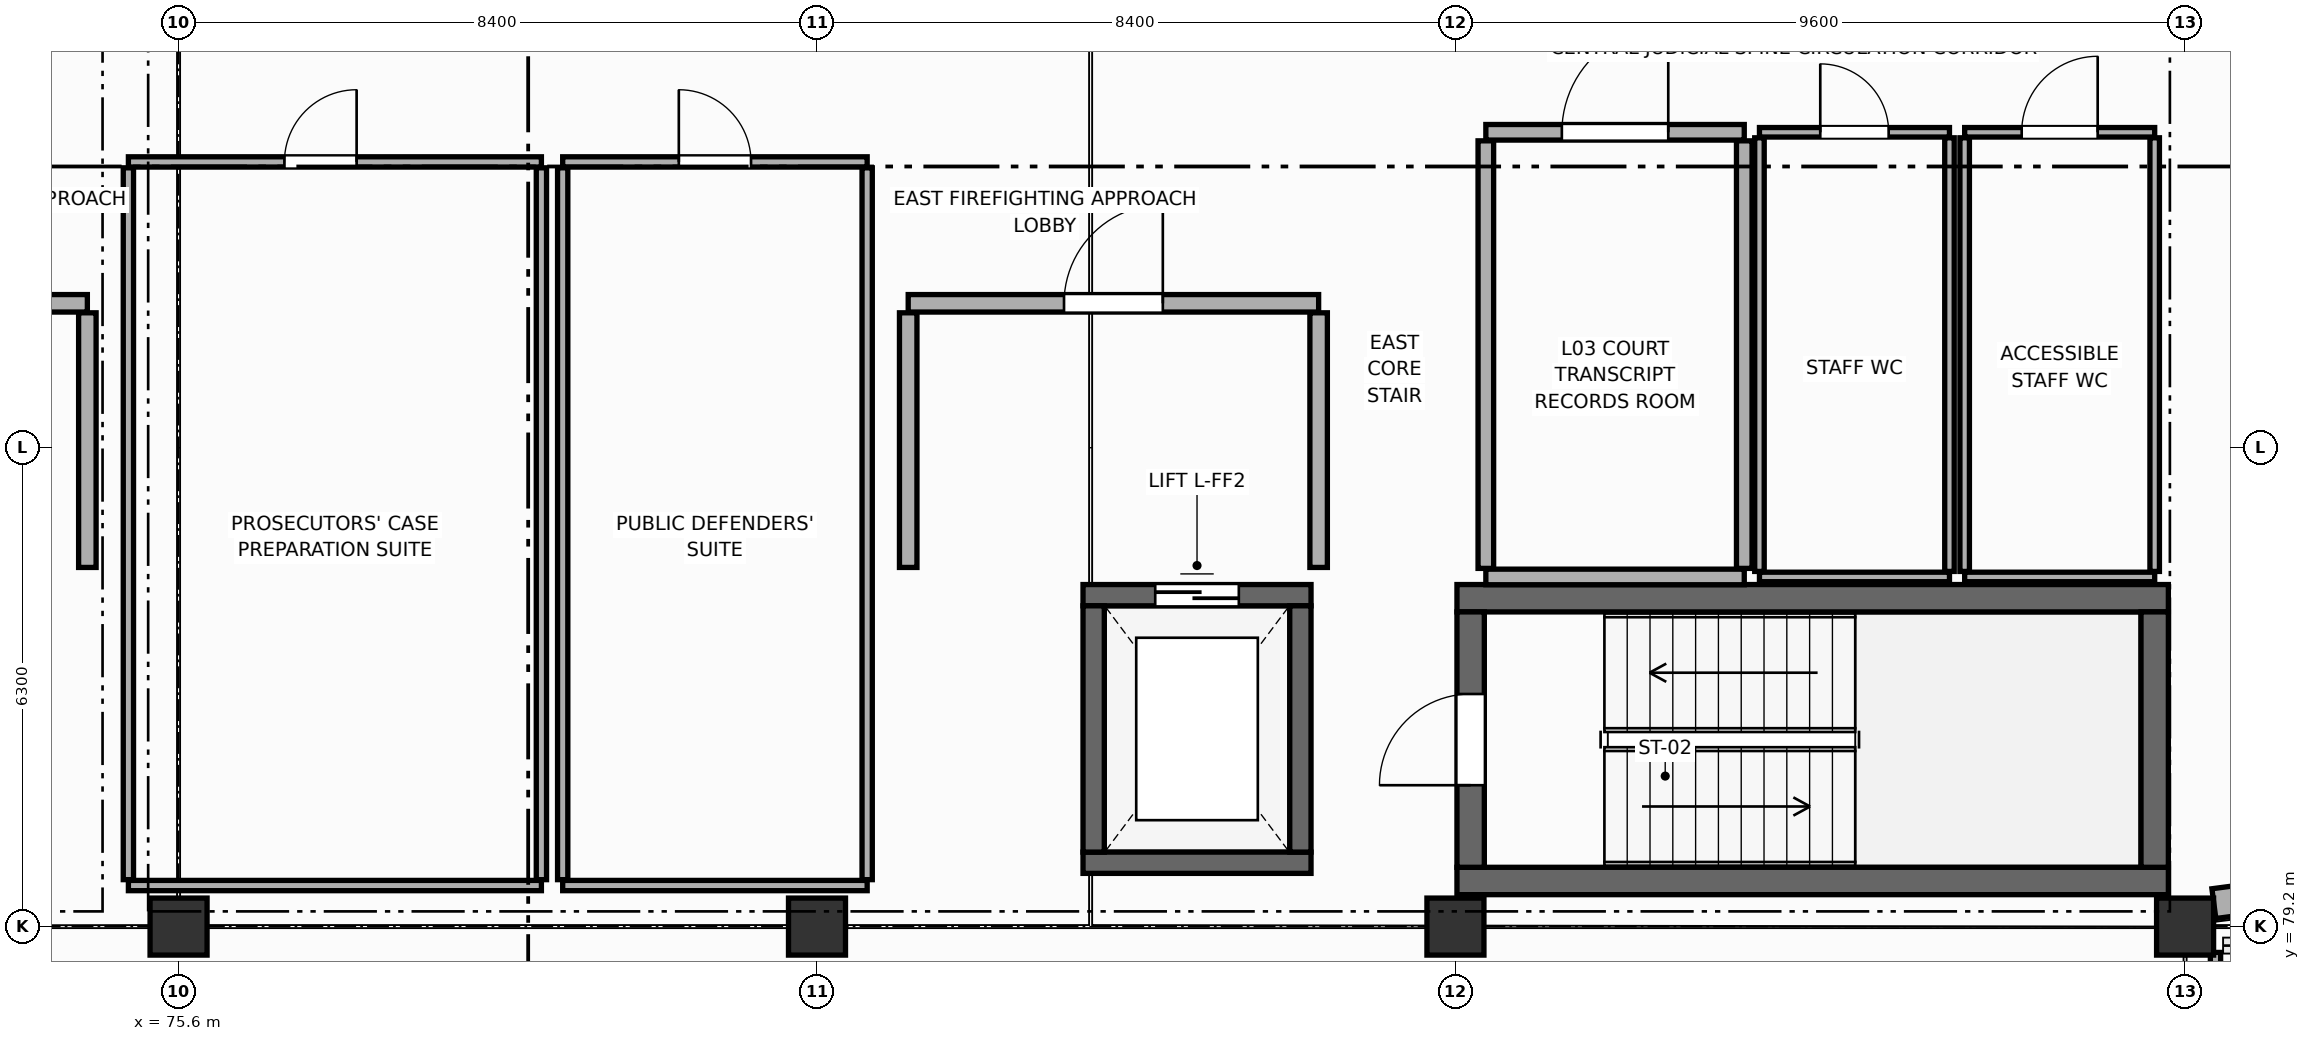
"""IFC4 building model, lengths in metres.
Left out: names, types, materials, properties, quantities, classifications, styles, units other than length and angle.
Written with IfcOpenShell. Run it as: python <this file> out.ifc"""

import sys

from ifc_helpers import new_model, si_unit, direction, frame, frame_2d, origin, origin_2d, place, context, subcontext, project, spatial, rectangle, extrude, element, fill, save


model = new_model("IFC4")
c1 = context("Model", 3, precision=1e-05, world=origin(), true_north=direction((0.0, 1.0)))
c2 = subcontext(c1, "Body", "Model", "MODEL_VIEW")
j1 = project(units=[si_unit("LENGTHUNIT", "METRE"), si_unit("PLANEANGLEUNIT", "RADIAN")], contexts=[c1])
p1 = place(None, origin())
s1 = spatial("IfcSite", under=j1, at=p1, CompositionType="ELEMENT")
p2 = place(p1, origin())
s2 = spatial("IfcBuilding", under=s1, at=p2, CompositionType="ELEMENT")
p3 = place(p2, frame((0.0, 0.0, 9.9)))
s3 = spatial("IfcBuildingStorey", under=s2, at=p3, CompositionType="ELEMENT", Elevation=9.9)
for number, where, z_axis, x_axis in (
    (1, (75.6, 79.2, 0.0), (0.0, 0.0, 1.0), (1.0, 0.0, 0.0)),
    (2, (84.0, 79.2, 0.0), (0.0, 0.0, 1.0), (1.0, 0.0, 0.0)),
    (3, (92.4, 79.2, 0.0), (0.0, 0.0, 1.0), (1.0, 0.0, 0.0)),
    (4, (102.0, 79.2, 0.0), (0.0, 0.0, 1.0), (1.0, 0.0, 0.0)),
):
    element("IfcColumn", number, at=place(p3, frame(where, z_axis=z_axis, x_axis=x_axis)), inside=s3, PredefinedType="COLUMN", context=c2, shape_type="SweptSolid", body=[
        extrude(rectangle(XDim=0.75, YDim=0.75, at=origin_2d()), origin(), (0.0, 0.0, 1.0), 4.5),
    ])
p4 = place(p3, frame((102.379, 79.502, 0.0), z_axis=(0.0, 0.0, 1.0), x_axis=(0.991440991126, 0.130555586306, 0.0)))
e5 = element("IfcWall", 5, at=p4, inside=s3, PredefinedType="ELEMENTEDWALL", context=c2, shape_type="SweptSolid", body=[
    extrude(rectangle(XDim=2.874, YDim=0.395, at=frame_2d((1.437, 0.0))), origin(), (0.0, 0.0, 1.0), 3.38),
])
p5 = place(p4, frame((0.987, 0.0, 0.85)))
e6 = element("IfcOpeningElement", 6, at=p5, cuts=e5, PredefinedType="OPENING", context=c2, shape_type="SweptSolid", body=[
    extrude(rectangle(XDim=0.9, YDim=1.85, at=frame_2d((0.45, 0.925))), frame((0.0, 0.208, 0.0), z_axis=(0.0, -1.0, 0.0), x_axis=(1.0, 0.0, 0.0)), (0.0, 0.0, 1.0), 0.415),
])
for number, where, z_axis, x_axis in (
    (7, (92.42, 83.52, 0.0), (0.0, 0.0, 1.0), (1.0, 0.0, 0.0)),
    (8, (101.78, 79.8, 0.0), (0.0, 0.0, 1.0), (-1.0, 0.0, 0.0)),
):
    element("IfcWall", number, at=place(p3, frame(where, z_axis=z_axis, x_axis=x_axis)), inside=s3, PredefinedType="SHEAR", context=c2, shape_type="SweptSolid", body=[
        extrude(rectangle(XDim=9.36, YDim=0.36, at=frame_2d((4.68, 0.0))), origin(), (0.0, 0.0, 1.0), 4.25),
    ])
p6 = place(p3, frame((92.6, 79.98, 0.0), z_axis=(0.0, 0.0, 1.0), x_axis=(0.0, 1.0, 0.0)))
e9 = element("IfcWall", 9, at=p6, inside=s3, PredefinedType="SHEAR", context=c2, shape_type="SweptSolid", body=[
    extrude(rectangle(XDim=3.36, YDim=0.36, at=frame_2d((1.68, 0.0))), origin(), (0.0, 0.0, 1.0), 4.25),
])
p7 = place(p6, frame((1.08, 0.0, 0.0)))
e10 = element("IfcOpeningElement", 10, at=p7, cuts=e9, PredefinedType="OPENING", context=c2, shape_type="SweptSolid", body=[
    extrude(rectangle(XDim=1.2, YDim=2.2, at=frame_2d((0.6, 1.1))), frame((0.0, 0.19, 0.0), z_axis=(0.0, -1.0, 0.0), x_axis=(1.0, 0.0, 0.0)), (0.0, 0.0, 1.0), 0.38),
])
p8 = place(p3, frame((101.6, 83.34, 0.0), z_axis=(0.0, 0.0, 1.0), x_axis=(0.0, -1.0, 0.0)))
e11 = element("IfcWall", 11, at=p8, inside=s3, PredefinedType="SHEAR", context=c2, shape_type="SweptSolid", body=[
    extrude(rectangle(XDim=3.36, YDim=0.36, at=frame_2d((1.68, 0.0))), origin(), (0.0, 0.0, 1.0), 4.25),
])
p9 = place(p3, frame((87.5, 83.56, 0.0), z_axis=(0.0, 0.0, 1.0), x_axis=(1.0, 0.0, 0.0)))
e12 = element("IfcWall", 12, at=p9, inside=s3, PredefinedType="SHEAR", context=c2, shape_type="SweptSolid", body=[
    extrude(rectangle(XDim=3.0, YDim=0.28, at=frame_2d((1.5, 0.0))), origin(), (0.0, 0.0, 1.0), 4.25),
])
p10 = place(p9, frame((0.95, 0.0, 0.0)))
e13 = element("IfcOpeningElement", 13, at=p10, cuts=e12, PredefinedType="OPENING", context=c2, shape_type="SweptSolid", body=[
    extrude(rectangle(XDim=1.1, YDim=2.2, at=frame_2d((0.55, 1.1))), frame((0.0, 0.15, 0.0), z_axis=(0.0, -1.0, 0.0), x_axis=(1.0, 0.0, 0.0)), (0.0, 0.0, 1.0), 0.3),
])
p11 = place(p3, frame((90.5, 80.04, 0.0), z_axis=(0.0, 0.0, 1.0), x_axis=(-1.0, 0.0, 0.0)))
e14 = element("IfcWall", 14, at=p11, inside=s3, PredefinedType="SHEAR", context=c2, shape_type="SweptSolid", body=[
    extrude(rectangle(XDim=3.0, YDim=0.28, at=frame_2d((1.5, 0.0))), origin(), (0.0, 0.0, 1.0), 4.25),
])
for number, where, z_axis, x_axis in (
    (15, (87.64, 80.18, 0.0), (0.0, 0.0, 1.0), (0.0, 1.0, 0.0)),
    (16, (90.36, 83.42, 0.0), (0.0, 0.0, 1.0), (0.0, -1.0, 0.0)),
):
    element("IfcWall", number, at=place(p3, frame(where, z_axis=z_axis, x_axis=x_axis)), inside=s3, PredefinedType="SHEAR", context=c2, shape_type="SweptSolid", body=[
        extrude(rectangle(XDim=3.24, YDim=0.28, at=frame_2d((1.62, 0.0))), origin(), (0.0, 0.0, 1.0), 4.25),
    ])
p12 = place(p3, frame((69.0, 87.4, 0.0), z_axis=(0.0, 0.0, 1.0), x_axis=(1.0, 0.0, 0.0)))
e17 = element("IfcWall", 17, at=p12, inside=s3, PredefinedType="STANDARD", context=c2, shape_type="SweptSolid", body=[
    extrude(rectangle(XDim=5.4, YDim=0.23, at=frame_2d((2.7, 0.0))), origin(), (0.0, 0.0, 1.0), 4.235),
])
p13 = place(p12, frame((2.05, 0.0, 0.0)))
e18 = element("IfcOpeningElement", 18, at=p13, cuts=e17, PredefinedType="OPENING", context=c2, shape_type="SweptSolid", body=[
    extrude(rectangle(XDim=1.3, YDim=2.2, at=frame_2d((0.65, 1.1))), frame((0.0, 0.125, 0.0), z_axis=(0.0, -1.0, 0.0), x_axis=(1.0, 0.0, 0.0)), (0.0, 0.0, 1.0), 0.25),
])
p14 = place(p3, frame((74.4, 87.275, 0.0), z_axis=(0.0, 0.0, 1.0), x_axis=(0.0, -1.0, 0.0)))
e19 = element("IfcWall", 19, at=p14, inside=s3, PredefinedType="STANDARD", context=c2, shape_type="SweptSolid", body=[
    extrude(rectangle(XDim=3.35, YDim=0.23, at=frame_2d((1.675, 0.0))), origin(), (0.0, 0.0, 1.0), 4.235),
])
p15 = place(p3, frame((85.2, 87.4, 0.0), z_axis=(0.0, 0.0, 1.0), x_axis=(1.0, 0.0, 0.0)))
e20 = element("IfcWall", 20, at=p15, inside=s3, PredefinedType="STANDARD", context=c2, shape_type="SweptSolid", body=[
    extrude(rectangle(XDim=5.4, YDim=0.23, at=frame_2d((2.7, 0.0))), origin(), (0.0, 0.0, 1.0), 3.63),
])
p16 = place(p15, frame((2.05, 0.0, 0.0)))
e21 = element("IfcOpeningElement", 21, at=p16, cuts=e20, PredefinedType="OPENING", context=c2, shape_type="SweptSolid", body=[
    extrude(rectangle(XDim=1.3, YDim=2.2, at=frame_2d((0.65, 1.1))), frame((0.0, 0.125, 0.0), z_axis=(0.0, -1.0, 0.0), x_axis=(1.0, 0.0, 0.0)), (0.0, 0.0, 1.0), 0.25),
])
for number, where, z_axis, x_axis in (
    (22, (85.2, 83.925, 0.0), (0.0, 0.0, 1.0), (0.0, 1.0, 0.0)),
    (23, (90.6, 87.275, 0.0), (0.0, 0.0, 1.0), (0.0, -1.0, 0.0)),
):
    element("IfcWall", number, at=place(p3, frame(where, z_axis=z_axis, x_axis=x_axis)), inside=s3, PredefinedType="STANDARD", context=c2, shape_type="SweptSolid", body=[
        extrude(rectangle(XDim=3.35, YDim=0.23, at=frame_2d((1.675, 0.0))), origin(), (0.0, 0.0, 1.0), 3.63),
    ])
p17 = place(p3, frame((96.4, 89.65, 0.0), z_axis=(0.0, 0.0, 1.0), x_axis=(1.0, 0.0, 0.0)))
e24 = element("IfcWall", 24, at=p17, inside=s3, PredefinedType="PARTITIONING", context=c2, shape_type="SweptSolid", body=[
    extrude(rectangle(XDim=2.5, YDim=0.125, at=frame_2d((1.25, 0.0))), origin(), (0.0, 0.0, 1.0), 4.235),
])
p18 = place(p17, frame((0.8, 0.0, 0.0)))
e25 = element("IfcOpeningElement", 25, at=p18, cuts=e24, PredefinedType="OPENING", context=c2, shape_type="SweptSolid", body=[
    extrude(rectangle(XDim=0.9, YDim=2.1, at=frame_2d((0.45, 1.05))), frame((0.0, 0.073, 0.0), z_axis=(0.0, -1.0, 0.0), x_axis=(1.0, 0.0, 0.0)), (0.0, 0.0, 1.0), 0.145),
])
p19 = place(p3, frame((98.9, 83.8, 0.0), z_axis=(0.0, 0.0, 1.0), x_axis=(-1.0, 0.0, 0.0)))
e26 = element("IfcWall", 26, at=p19, inside=s3, PredefinedType="PARTITIONING", context=c2, shape_type="SweptSolid", body=[
    extrude(rectangle(XDim=2.5, YDim=0.125, at=frame_2d((1.25, 0.0))), origin(), (0.0, 0.0, 1.0), 4.235),
])
for number, where, z_axis, x_axis in (
    (27, (96.4, 83.873, 0.0), (0.0, 0.0, 1.0), (0.0, 1.0, 0.0)),
    (28, (98.9, 89.577, 0.0), (0.0, 0.0, 1.0), (0.0, -1.0, 0.0)),
):
    element("IfcWall", number, at=place(p3, frame(where, z_axis=z_axis, x_axis=x_axis)), inside=s3, PredefinedType="PARTITIONING", context=c2, shape_type="SweptSolid", body=[
        extrude(rectangle(XDim=5.705, YDim=0.125, at=frame_2d((2.853, 0.0))), origin(), (0.0, 0.0, 1.0), 3.63),
    ])
p20 = place(p3, frame((99.1, 89.65, 0.0), z_axis=(0.0, 0.0, 1.0), x_axis=(1.0, 0.0, 0.0)))
e29 = element("IfcWall", 29, at=p20, inside=s3, PredefinedType="PARTITIONING", context=c2, shape_type="SweptSolid", body=[
    extrude(rectangle(XDim=2.5, YDim=0.125, at=frame_2d((1.25, 0.0))), origin(), (0.0, 0.0, 1.0), 3.38),
])
p21 = place(p20, frame((0.75, 0.0, 0.0)))
e30 = element("IfcOpeningElement", 30, at=p21, cuts=e29, PredefinedType="OPENING", context=c2, shape_type="SweptSolid", body=[
    extrude(rectangle(XDim=1.0, YDim=2.1, at=frame_2d((0.5, 1.05))), frame((0.0, 0.073, 0.0), z_axis=(0.0, -1.0, 0.0), x_axis=(1.0, 0.0, 0.0)), (0.0, 0.0, 1.0), 0.145),
])
p22 = place(p3, frame((101.6, 83.8, 0.0), z_axis=(0.0, 0.0, 1.0), x_axis=(-1.0, 0.0, 0.0)))
e31 = element("IfcWall", 31, at=p22, inside=s3, PredefinedType="PARTITIONING", context=c2, shape_type="SweptSolid", body=[
    extrude(rectangle(XDim=2.5, YDim=0.125, at=frame_2d((1.25, 0.0))), origin(), (0.0, 0.0, 1.0), 3.38),
])
p23 = place(p3, frame((99.1, 83.873, 0.0), z_axis=(0.0, 0.0, 1.0), x_axis=(0.0, 1.0, 0.0)))
e32 = element("IfcWall", 32, at=p23, inside=s3, PredefinedType="PARTITIONING", context=c2, shape_type="SweptSolid", body=[
    extrude(rectangle(XDim=5.705, YDim=0.125, at=frame_2d((2.853, 0.0))), origin(), (0.0, 0.0, 1.0), 3.63),
])
p24 = place(p3, frame((101.6, 89.577, 0.0), z_axis=(0.0, 0.0, 1.0), x_axis=(0.0, -1.0, 0.0)))
e33 = element("IfcWall", 33, at=p24, inside=s3, PredefinedType="PARTITIONING", context=c2, shape_type="SweptSolid", body=[
    extrude(rectangle(XDim=5.705, YDim=0.125, at=frame_2d((2.853, 0.0))), origin(), (0.0, 0.0, 1.0), 3.38),
])
p25 = place(p3, frame((92.8, 89.65, 0.0), z_axis=(0.0, 0.0, 1.0), x_axis=(1.0, 0.0, 0.0)))
e34 = element("IfcWall", 34, at=p25, inside=s3, PredefinedType="STANDARD", context=c2, shape_type="SweptSolid", body=[
    extrude(rectangle(XDim=3.4, YDim=0.205, at=frame_2d((1.7, 0.0))), origin(), (0.0, 0.0, 1.0), 3.38),
])
p26 = place(p25, frame((1.0, 0.0, 0.0)))
e35 = element("IfcOpeningElement", 35, at=p26, cuts=e34, PredefinedType="OPENING", context=c2, shape_type="SweptSolid", body=[
    extrude(rectangle(XDim=1.4, YDim=2.25, at=frame_2d((0.7, 1.125))), frame((0.0, 0.113, 0.0), z_axis=(0.0, -1.0, 0.0), x_axis=(1.0, 0.0, 0.0)), (0.0, 0.0, 1.0), 0.225),
])
p27 = place(p3, frame((96.2, 83.8, 0.0), z_axis=(0.0, 0.0, 1.0), x_axis=(-1.0, 0.0, 0.0)))
e36 = element("IfcWall", 36, at=p27, inside=s3, PredefinedType="STANDARD", context=c2, shape_type="SweptSolid", body=[
    extrude(rectangle(XDim=3.4, YDim=0.205, at=frame_2d((1.7, 0.0))), origin(), (0.0, 0.0, 1.0), 3.38),
])
p28 = place(p3, frame((92.8, 83.913, 0.0), z_axis=(0.0, 0.0, 1.0), x_axis=(0.0, 1.0, 0.0)))
e37 = element("IfcWall", 37, at=p28, inside=s3, PredefinedType="STANDARD", context=c2, shape_type="SweptSolid", body=[
    extrude(rectangle(XDim=5.625, YDim=0.205, at=frame_2d((2.812, 0.0))), origin(), (0.0, 0.0, 1.0), 3.38),
])
p29 = place(p3, frame((96.2, 89.538, 0.0), z_axis=(0.0, 0.0, 1.0), x_axis=(0.0, -1.0, 0.0)))
e38 = element("IfcWall", 38, at=p29, inside=s3, PredefinedType="STANDARD", context=c2, shape_type="SweptSolid", body=[
    extrude(rectangle(XDim=5.625, YDim=0.205, at=frame_2d((2.812, 0.0))), origin(), (0.0, 0.0, 1.0), 3.63),
])
p30 = place(p3, frame((102.4, 70.877, 0.0), z_axis=(0.0, 0.0, 1.0), x_axis=(0.0, 1.0, 0.0)))
e39 = element("IfcWall", 39, at=p30, inside=s3, PredefinedType="PARTITIONING", context=c2, shape_type="SweptSolid", body=[
    extrude(rectangle(XDim=7.983, YDim=0.135, at=frame_2d((3.991, 0.0))), origin(), (0.0, 0.0, 1.0), 3.38),
])
p31 = place(p3, frame((74.94, 89.26, 0.0), z_axis=(0.0, 0.0, 1.0), x_axis=(1.0, 0.0, 0.0)))
e40 = element("IfcWall", 40, at=p31, inside=s3, PredefinedType="PARTITIONING", context=c2, shape_type="SweptSolid", body=[
    extrude(rectangle(XDim=5.434, YDim=0.135, at=frame_2d((2.717, 0.0))), origin(), (0.0, 0.0, 1.0), 3.38),
])
p32 = place(p31, frame((2.053, 0.0, 0.0)))
e41 = element("IfcOpeningElement", 41, at=p32, cuts=e40, PredefinedType="OPENING", context=c2, shape_type="SweptSolid", body=[
    extrude(rectangle(XDim=0.95, YDim=2.15, at=frame_2d((0.475, 1.075))), frame((0.0, 0.077, 0.0), z_axis=(0.0, -1.0, 0.0), x_axis=(1.0, 0.0, 0.0)), (0.0, 0.0, 1.0), 0.155),
])
p33 = place(p3, frame((80.374, 79.74, 0.0), z_axis=(0.0, 0.0, 1.0), x_axis=(-1.0, 0.0, 0.0)))
e42 = element("IfcWall", 42, at=p33, inside=s3, PredefinedType="PARTITIONING", context=c2, shape_type="SweptSolid", body=[
    extrude(rectangle(XDim=5.434, YDim=0.135, at=frame_2d((2.717, 0.0))), origin(), (0.0, 0.0, 1.0), 3.38),
])
p34 = place(p3, frame((74.94, 79.817, 0.0), z_axis=(0.0, 0.0, 1.0), x_axis=(0.0, 1.0, 0.0)))
e43 = element("IfcWall", 43, at=p34, inside=s3, PredefinedType="PARTITIONING", context=c2, shape_type="SweptSolid", body=[
    extrude(rectangle(XDim=9.365, YDim=0.135, at=frame_2d((4.683, 0.0))), origin(), (0.0, 0.0, 1.0), 4.235),
])
p35 = place(p3, frame((80.374, 89.183, 0.0), z_axis=(0.0, 0.0, 1.0), x_axis=(0.0, -1.0, 0.0)))
e44 = element("IfcWall", 44, at=p35, inside=s3, PredefinedType="PARTITIONING", context=c2, shape_type="SweptSolid", body=[
    extrude(rectangle(XDim=9.365, YDim=0.135, at=frame_2d((4.683, 0.0))), origin(), (0.0, 0.0, 1.0), 3.63),
])
p36 = place(p3, frame((80.654, 89.26, 0.0), z_axis=(0.0, 0.0, 1.0), x_axis=(1.0, 0.0, 0.0)))
e45 = element("IfcWall", 45, at=p36, inside=s3, PredefinedType="PARTITIONING", context=c2, shape_type="SweptSolid", body=[
    extrude(rectangle(XDim=4.006, YDim=0.135, at=frame_2d((2.003, 0.0))), origin(), (0.0, 0.0, 1.0), 3.38),
])
p37 = place(p36, frame((1.528, 0.0, 0.0)))
e46 = element("IfcOpeningElement", 46, at=p37, cuts=e45, PredefinedType="OPENING", context=c2, shape_type="SweptSolid", body=[
    extrude(rectangle(XDim=0.95, YDim=2.15, at=frame_2d((0.475, 1.075))), frame((0.0, 0.077, 0.0), z_axis=(0.0, -1.0, 0.0), x_axis=(1.0, 0.0, 0.0)), (0.0, 0.0, 1.0), 0.155),
])
p38 = place(p3, frame((84.66, 79.74, 0.0), z_axis=(0.0, 0.0, 1.0), x_axis=(-1.0, 0.0, 0.0)))
e47 = element("IfcWall", 47, at=p38, inside=s3, PredefinedType="PARTITIONING", context=c2, shape_type="SweptSolid", body=[
    extrude(rectangle(XDim=4.006, YDim=0.135, at=frame_2d((2.003, 0.0))), origin(), (0.0, 0.0, 1.0), 3.38),
])
for number, where, z_axis, x_axis in (
    (48, (80.654, 79.817, 0.0), (0.0, 0.0, 1.0), (0.0, 1.0, 0.0)),
    (49, (84.66, 89.183, 0.0), (0.0, 0.0, 1.0), (0.0, -1.0, 0.0)),
):
    element("IfcWall", number, at=place(p3, frame(where, z_axis=z_axis, x_axis=x_axis)), inside=s3, PredefinedType="PARTITIONING", context=c2, shape_type="SweptSolid", body=[
        extrude(rectangle(XDim=9.365, YDim=0.135, at=frame_2d((4.683, 0.0))), origin(), (0.0, 0.0, 1.0), 3.63),
    ])
p39 = place(p7, origin())
e50 = element("IfcDoor", 50, at=p39, inside=s3, OperationType="SINGLE_SWING_LEFT", PredefinedType="DOOR", context=c2, shape_type="SweptSolid", body=[
    extrude(rectangle(XDim=1.2, YDim=2.2, at=frame_2d((0.6, 1.1))), frame((0.0, 0.025, 0.0), z_axis=(0.0, -1.0, 0.0), x_axis=(1.0, 0.0, 0.0)), (0.0, 0.0, 1.0), 0.05),
])
fill(e10, e50)
p40 = place(p10, origin())
e51 = element("IfcDoor", 51, at=p40, inside=s3, OperationType="DOUBLE_DOOR_SLIDING", PredefinedType="DOOR", context=c2, shape_type="SweptSolid", body=[
    extrude(rectangle(XDim=1.1, YDim=2.2, at=frame_2d((0.55, 1.1))), frame((0.0, 0.025, 0.0), z_axis=(0.0, -1.0, 0.0), x_axis=(1.0, 0.0, 0.0)), (0.0, 0.0, 1.0), 0.05),
])
fill(e13, e51)
p41 = place(p16, origin())
e52 = element("IfcDoor", 52, at=p41, inside=s3, OperationType="SINGLE_SWING_RIGHT", PredefinedType="DOOR", context=c2, shape_type="SweptSolid", body=[
    extrude(rectangle(XDim=1.3, YDim=2.2, at=frame_2d((0.65, 1.1))), frame((0.0, 0.025, 0.0), z_axis=(0.0, -1.0, 0.0), x_axis=(1.0, 0.0, 0.0)), (0.0, 0.0, 1.0), 0.05),
])
fill(e21, e52)
p42 = place(p18, origin())
e53 = element("IfcDoor", 53, at=p42, inside=s3, OperationType="SINGLE_SWING_LEFT", PredefinedType="DOOR", context=c2, shape_type="SweptSolid", body=[
    extrude(rectangle(XDim=0.9, YDim=2.1, at=frame_2d((0.45, 1.05))), frame((0.0, 0.025, 0.0), z_axis=(0.0, -1.0, 0.0), x_axis=(1.0, 0.0, 0.0)), (0.0, 0.0, 1.0), 0.05),
])
fill(e25, e53)
p43 = place(p21, origin())
e54 = element("IfcDoor", 54, at=p43, inside=s3, OperationType="SINGLE_SWING_RIGHT", PredefinedType="DOOR", context=c2, shape_type="SweptSolid", body=[
    extrude(rectangle(XDim=1.0, YDim=2.1, at=frame_2d((0.5, 1.05))), frame((0.0, 0.025, 0.0), z_axis=(0.0, -1.0, 0.0), x_axis=(1.0, 0.0, 0.0)), (0.0, 0.0, 1.0), 0.05),
])
fill(e30, e54)
p44 = place(p26, origin())
e55 = element("IfcDoor", 55, at=p44, inside=s3, OperationType="SINGLE_SWING_RIGHT", PredefinedType="DOOR", context=c2, shape_type="SweptSolid", body=[
    extrude(rectangle(XDim=1.4, YDim=2.25, at=frame_2d((0.7, 1.125))), frame((0.0, 0.025, 0.0), z_axis=(0.0, -1.0, 0.0), x_axis=(1.0, 0.0, 0.0)), (0.0, 0.0, 1.0), 0.05),
])
fill(e35, e55)
p45 = place(p32, origin())
e56 = element("IfcDoor", 56, at=p45, inside=s3, OperationType="SINGLE_SWING_RIGHT", PredefinedType="DOOR", context=c2, shape_type="SweptSolid", body=[
    extrude(rectangle(XDim=0.95, YDim=2.15, at=frame_2d((0.475, 1.075))), frame((0.0, 0.025, 0.0), z_axis=(0.0, -1.0, 0.0), x_axis=(1.0, 0.0, 0.0)), (0.0, 0.0, 1.0), 0.05),
])
fill(e41, e56)
p46 = place(p37, origin())
e57 = element("IfcDoor", 57, at=p46, inside=s3, OperationType="SINGLE_SWING_LEFT", PredefinedType="DOOR", context=c2, shape_type="SweptSolid", body=[
    extrude(rectangle(XDim=0.95, YDim=2.15, at=frame_2d((0.475, 1.075))), frame((0.0, 0.025, 0.0), z_axis=(0.0, -1.0, 0.0), x_axis=(1.0, 0.0, 0.0)), (0.0, 0.0, 1.0), 0.05),
])
fill(e46, e57)
save(model, sys.argv[1])
